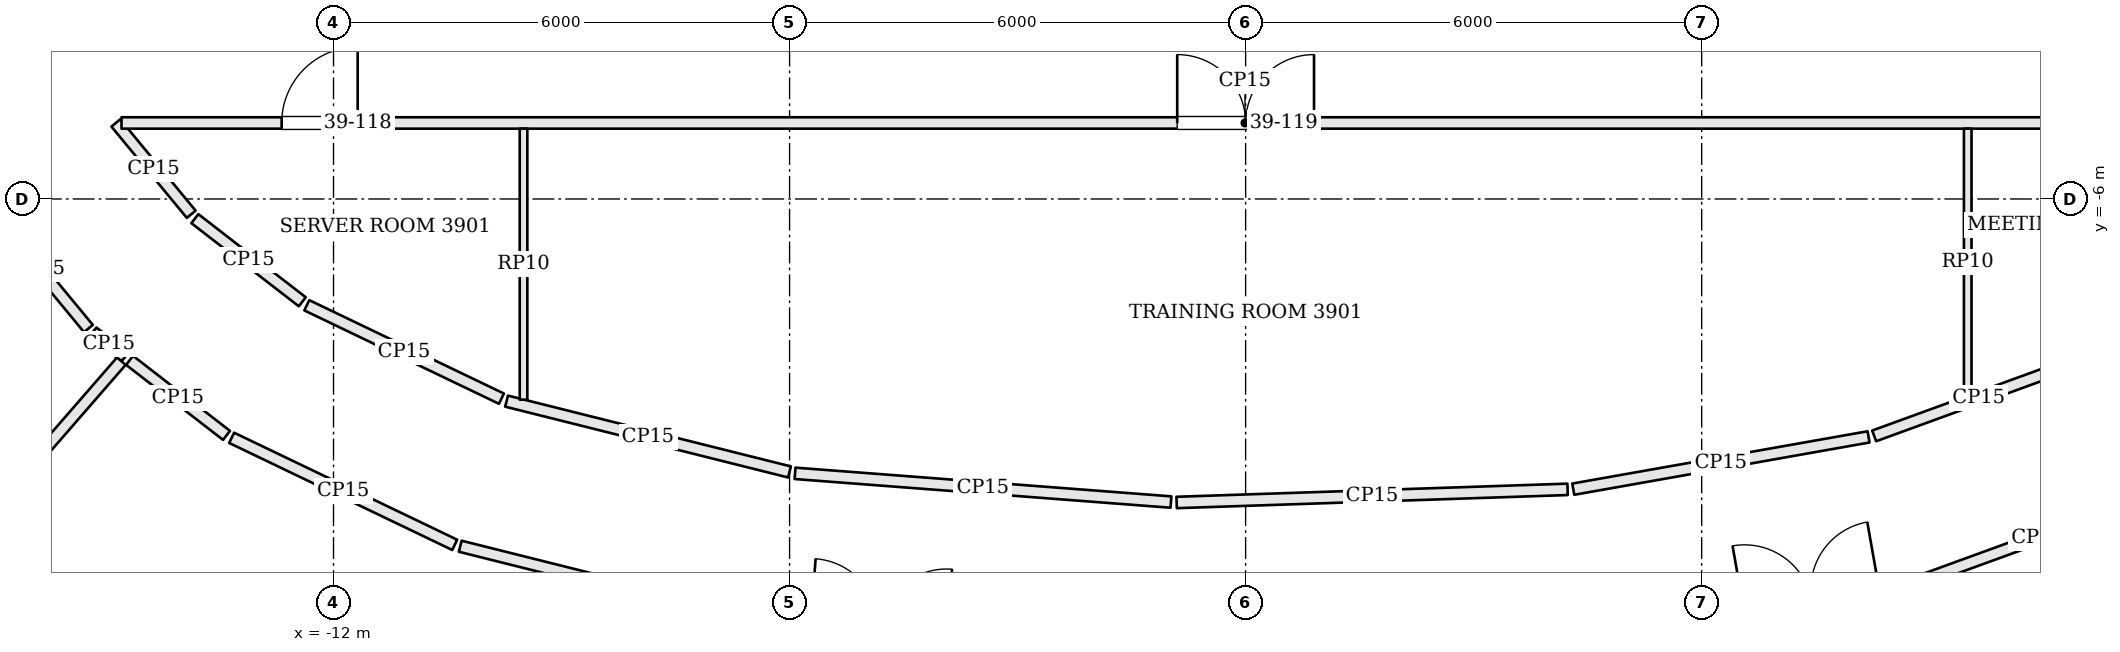
"""IFC4 building model, lengths in metres.
Left out: names, types, materials, properties, quantities, classifications, styles, units other than length and angle.
Written with IfcOpenShell. Run it as: python <this file> out.ifc"""

import sys

from ifc_helpers import new_model, si_unit, direction, frame, frame_2d, origin, place, context, subcontext, project, spatial, rectangle, extrude, element, fill, save


model = new_model("IFC4")
c1 = context("Model", 3, precision=1e-05, world=origin(), true_north=direction((0.0, 1.0)))
c2 = subcontext(c1, "Body", "Model", "MODEL_VIEW")
j1 = project(units=[si_unit("LENGTHUNIT", "METRE"), si_unit("PLANEANGLEUNIT", "RADIAN")], contexts=[c1])
p1 = place(None, origin())
s1 = spatial("IfcSite", under=j1, at=p1, CompositionType="ELEMENT")
p2 = place(p1, origin())
s2 = spatial("IfcBuilding", under=s1, at=p2, CompositionType="ELEMENT")
p3 = place(p2, frame((0.0, 0.0, 161.7)))
s3 = spatial("IfcBuildingStorey", under=s2, at=p3, CompositionType="ELEMENT", Elevation=161.7)
p4 = place(p3, frame((-16.523, -6.132, 0.0), z_axis=(0.0, 0.0, 1.0), x_axis=(0.636763898907, -0.771058841496, 0.0)))
e1 = element("IfcWall", 1, at=p4, inside=s3, PredefinedType="PARTITIONING", context=c2, shape_type="SweptSolid", body=[
    extrude(rectangle(XDim=2.04, YDim=0.15, at=frame_2d((1.02, 0.0))), origin(), (0.0, 0.0, 1.0), 3.198),
])
p5 = place(p3, frame((-15.165, -7.75, 0.0), z_axis=(0.0, 0.0, 1.0), x_axis=(0.79097337153, -0.611850574511, 0.0)))
e2 = element("IfcWall", 2, at=p5, inside=s3, PredefinedType="PARTITIONING", context=c2, shape_type="SweptSolid", body=[
    extrude(rectangle(XDim=0.534, YDim=0.15, at=frame_2d((0.267, 0.0))), origin(), (0.0, 0.0, 1.0), 3.198),
])
p6 = place(p3, frame((-17.618, -11.383, 0.0), z_axis=(0.0, 0.0, 1.0), x_axis=(0.656310626484, 0.754490796209, 0.0)))
e3 = element("IfcWall", 3, at=p6, inside=s3, PredefinedType="PARTITIONING", context=c2, shape_type="SweptSolid", body=[
    extrude(rectangle(XDim=4.307, YDim=0.15, at=frame_2d((2.153, 0.0))), origin(), (0.0, 0.0, 1.0), 3.234),
])
p7 = place(p3, frame((-14.683, -8.123, 0.0), z_axis=(0.0, 0.0, 1.0), x_axis=(0.790898614368, -0.611947205068, 0.0)))
e4 = element("IfcWall", 4, at=p7, inside=s3, PredefinedType="PARTITIONING", context=c2, shape_type="SweptSolid", body=[
    extrude(rectangle(XDim=1.613, YDim=0.15, at=frame_2d((0.806, 0.0))), origin(), (0.0, 0.0, 1.0), 3.198),
])
p8 = place(p3, frame((-13.34, -9.142, 0.0), z_axis=(0.0, 0.0, 1.0), x_axis=(0.901599124721, -0.432572558425, 0.0)))
e5 = element("IfcWall", 5, at=p8, inside=s3, PredefinedType="PARTITIONING", context=c2, shape_type="SweptSolid", body=[
    extrude(rectangle(XDim=3.255, YDim=0.15, at=frame_2d((1.627, 0.0))), origin(), (0.0, 0.0, 1.0), 3.198),
])
p9 = place(p3, frame((-10.333, -10.569, 0.0), z_axis=(0.0, 0.0, 1.0), x_axis=(0.970067398009, -0.242835836151, 0.0)))
e6 = element("IfcWall", 6, at=p9, inside=s3, PredefinedType="PARTITIONING", context=c2, shape_type="SweptSolid", body=[
    extrude(rectangle(XDim=4.209, YDim=0.15, at=frame_2d((2.105, 0.0))), origin(), (0.0, 0.0, 1.0), 3.198),
])
p10 = place(p3, frame((8.86, -11.03, 0.0), z_axis=(0.0, 0.0, 1.0), x_axis=(0.939685902536, 0.342038601001, 0.0)))
e7 = element("IfcWall", 7, at=p10, inside=s3, PredefinedType="PARTITIONING", context=c2, shape_type="SweptSolid", body=[
    extrude(rectangle(XDim=3.316, YDim=0.15, at=frame_2d((1.658, 0.0))), origin(), (0.0, 0.0, 1.0), 3.198),
])
p11 = place(p3, frame((11.021, -8.115, 0.0), z_axis=(0.0, 0.0, 1.0), x_axis=(-0.939683845313, -0.342044252778, 0.0)))
e8 = element("IfcWall", 8, at=p11, inside=s3, PredefinedType="PARTITIONING", context=c2, shape_type="SweptSolid", body=[
    extrude(rectangle(XDim=2.929, YDim=0.15, at=frame_2d((1.464, 0.0))), origin(), (0.0, 0.0, 1.0), 3.198),
])
p12 = place(p3, frame((8.195, -9.13, 0.0), z_axis=(0.0, 0.0, 1.0), x_axis=(-0.9846880937, -0.174325437403, 0.0)))
e9 = element("IfcWall", 9, at=p12, inside=s3, PredefinedType="PARTITIONING", context=c2, shape_type="SweptSolid", body=[
    extrude(rectangle(XDim=3.945, YDim=0.15, at=frame_2d((1.973, 0.0))), origin(), (0.0, 0.0, 1.0), 3.198),
])
p13 = place(p3, frame((4.236, -9.82, 0.0), z_axis=(0.0, 0.0, 1.0), x_axis=(-0.999435760561, -0.033588100749, 0.0)))
e10 = element("IfcWall", 10, at=p13, inside=s3, PredefinedType="PARTITIONING", context=c2, shape_type="SweptSolid", body=[
    extrude(rectangle(XDim=5.146, YDim=0.15, at=frame_2d((2.573, 0.0))), origin(), (0.0, 0.0, 1.0), 3.198),
])
p14 = place(p3, frame((-0.982, -9.987, 0.0), z_axis=(0.0, 0.0, 1.0), x_axis=(-0.997096607341, 0.07614693447, 0.0)))
e11 = element("IfcWall", 11, at=p14, inside=s3, PredefinedType="PARTITIONING", context=c2, shape_type="SweptSolid", body=[
    extrude(rectangle(XDim=4.96, YDim=0.15, at=frame_2d((2.48, 0.0))), origin(), (0.0, 0.0, 1.0), 3.198),
])
p15 = place(p3, frame((-6.001, -9.591, 0.0), z_axis=(0.0, 0.0, 1.0), x_axis=(-0.970063855769, 0.242849986061, 0.0)))
e12 = element("IfcWall", 12, at=p15, inside=s3, PredefinedType="PARTITIONING", context=c2, shape_type="SweptSolid", body=[
    extrude(rectangle(XDim=3.837, YDim=0.15, at=frame_2d((1.919, 0.0))), origin(), (0.0, 0.0, 1.0), 3.198),
])
p16 = place(p3, frame((-9.791, -8.627, 0.0), z_axis=(0.0, 0.0, 1.0), x_axis=(-0.901598165215, 0.432574558292, 0.0)))
e13 = element("IfcWall", 13, at=p16, inside=s3, PredefinedType="PARTITIONING", context=c2, shape_type="SweptSolid", body=[
    extrude(rectangle(XDim=2.84, YDim=0.15, at=frame_2d((1.42, 0.0))), origin(), (0.0, 0.0, 1.0), 3.198),
])
p17 = place(p3, frame((-12.411, -7.353, 0.0), z_axis=(0.0, 0.0, 1.0), x_axis=(-0.790894311556, 0.611952766109, 0.0)))
e14 = element("IfcWall", 14, at=p17, inside=s3, PredefinedType="PARTITIONING", context=c2, shape_type="SweptSolid", body=[
    extrude(rectangle(XDim=1.787, YDim=0.15, at=frame_2d((0.894, 0.0))), origin(), (0.0, 0.0, 1.0), 3.198),
])
p18 = place(p3, frame((-13.872, -6.201, 0.0), z_axis=(0.0, 0.0, 1.0), x_axis=(-0.636832838855, 0.771001903601, 0.0)))
e15 = element("IfcWall", 15, at=p18, inside=s3, PredefinedType="PARTITIONING", context=c2, shape_type="SweptSolid", body=[
    extrude(rectangle(XDim=1.558, YDim=0.15, at=frame_2d((0.779, 0.0))), origin(), (0.0, 0.0, 1.0), 3.198),
])
p19 = place(p3, frame((-14.789, -5.0, 0.0), z_axis=(0.0, 0.0, 1.0), x_axis=(1.0, 0.0, 0.0)))
e16 = element("IfcWall", 16, at=p19, inside=s3, PredefinedType="PARTITIONING", context=c2, shape_type="SweptSolid", body=[
    extrude(rectangle(XDim=29.562, YDim=0.15, at=frame_2d((14.781, 0.0))), origin(), (0.0, 0.0, 1.0), 3.198),
])
p20 = place(p19, frame((2.107, 0.0, 0.0)))
e17 = element("IfcOpeningElement", 17, at=p20, cuts=e16, PredefinedType="OPENING", context=c2, shape_type="SweptSolid", body=[
    extrude(rectangle(XDim=1.0, YDim=2.1, at=frame_2d((0.5, 1.05))), frame((0.0, 0.085, 0.0), z_axis=(0.0, -1.0, 0.0), x_axis=(1.0, 0.0, 0.0)), (0.0, 0.0, 1.0), 0.17),
])
p21 = place(p19, frame((13.889, 0.0, 0.0)))
e18 = element("IfcOpeningElement", 18, at=p21, cuts=e16, PredefinedType="OPENING", context=c2, shape_type="SweptSolid", body=[
    extrude(rectangle(XDim=1.8, YDim=2.1, at=frame_2d((0.9, 1.05))), frame((0.0, 0.085, 0.0), z_axis=(0.0, -1.0, 0.0), x_axis=(1.0, 0.0, 0.0)), (0.0, 0.0, 1.0), 0.17),
])
p22 = place(p19, frame((26.463, 0.0, 0.0)))
e19 = element("IfcOpeningElement", 19, at=p22, cuts=e16, PredefinedType="OPENING", context=c2, shape_type="SweptSolid", body=[
    extrude(rectangle(XDim=1.0, YDim=2.4, at=frame_2d((0.5, 1.2))), frame((0.0, 0.085, 0.0), z_axis=(0.0, -1.0, 0.0), x_axis=(1.0, 0.0, 0.0)), (0.0, 0.0, 1.0), 0.17),
])
p23 = place(p3, frame((-9.5, -8.64, 0.0), z_axis=(0.0, 0.0, 1.0), x_axis=(0.0, 1.0, 0.0)))
e20 = element("IfcWall", 20, at=p23, inside=s3, PredefinedType="PARTITIONING", context=c2, shape_type="SweptSolid", body=[
    extrude(rectangle(XDim=3.565, YDim=0.1, at=frame_2d((1.783, 0.0))), origin(), (0.0, 0.0, 1.0), 3.198),
])
p24 = place(p3, frame((9.5, -8.594, 0.0), z_axis=(0.0, 0.0, 1.0), x_axis=(0.0, 1.0, 0.0)))
e21 = element("IfcWall", 21, at=p24, inside=s3, PredefinedType="PARTITIONING", context=c2, shape_type="SweptSolid", body=[
    extrude(rectangle(XDim=3.519, YDim=0.1, at=frame_2d((1.759, 0.0))), origin(), (0.0, 0.0, 1.0), 3.198),
])
p25 = place(p20, origin())
e22 = element("IfcDoor", 22, at=p25, inside=s3, OperationType="SINGLE_SWING_RIGHT", PredefinedType="DOOR", context=c2, shape_type="SweptSolid", body=[
    extrude(rectangle(XDim=1.0, YDim=2.1, at=frame_2d((0.5, 1.05))), frame((0.0, 0.025, 0.0), z_axis=(0.0, -1.0, 0.0), x_axis=(1.0, 0.0, 0.0)), (0.0, 0.0, 1.0), 0.05),
])
fill(e17, e22)
p26 = place(p21, origin())
e23 = element("IfcDoor", 23, at=p26, inside=s3, OperationType="DOUBLE_DOOR_SINGLE_SWING", PredefinedType="DOOR", context=c2, shape_type="SweptSolid", body=[
    extrude(rectangle(XDim=1.8, YDim=2.1, at=frame_2d((0.9, 1.05))), frame((0.0, 0.025, 0.0), z_axis=(0.0, -1.0, 0.0), x_axis=(1.0, 0.0, 0.0)), (0.0, 0.0, 1.0), 0.05),
])
fill(e18, e23)
save(model, sys.argv[1])
